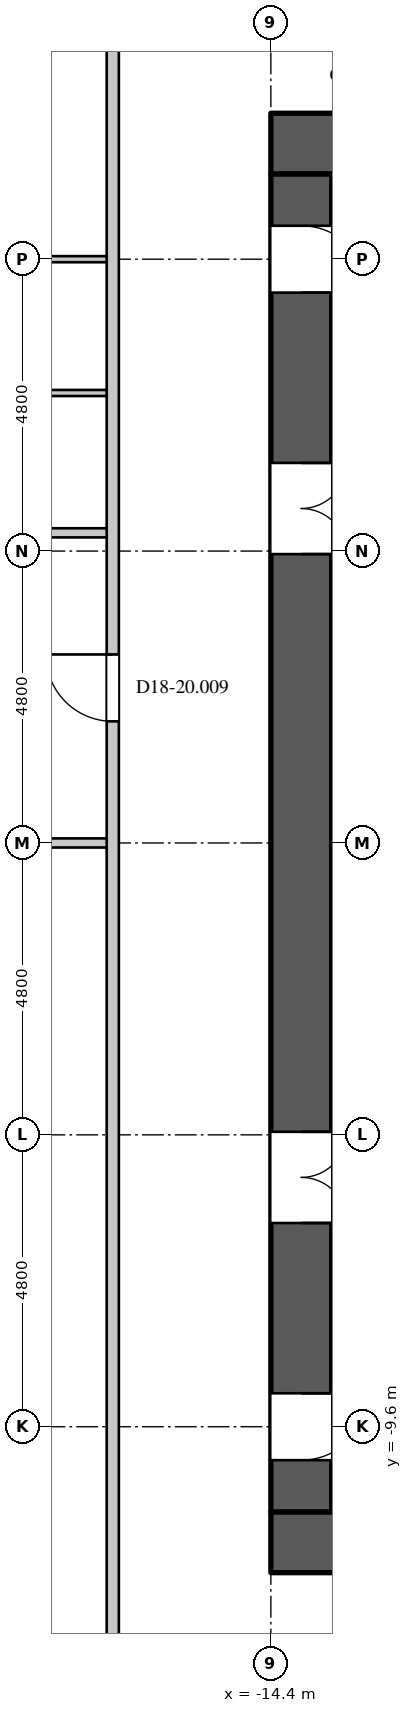
"""IFC4 building model, lengths in metres.
Left out: names, types, materials, properties, quantities, classifications, styles, units other than length and angle.
Written with IfcOpenShell. Run it as: python <this file> out.ifc"""

import sys

from ifc_helpers import new_model, si_unit, direction, frame, frame_2d, origin, place, context, subcontext, project, spatial, rectangle, extrude, element, fill, save


model = new_model("IFC4")
c1 = context("Model", 3, precision=1e-05, world=origin(), true_north=direction((0.0, 1.0)))
c2 = subcontext(c1, "Body", "Model", "MODEL_VIEW")
j1 = project(units=[si_unit("LENGTHUNIT", "METRE"), si_unit("PLANEANGLEUNIT", "RADIAN")], contexts=[c1])
p1 = place(None, origin())
s1 = spatial("IfcSite", under=j1, at=p1, CompositionType="ELEMENT")
p2 = place(p1, origin())
s2 = spatial("IfcBuilding", under=s1, at=p2, CompositionType="ELEMENT")
p3 = place(p2, frame((0.0, 0.0, 80.1)))
s3 = spatial("IfcBuildingStorey", under=s2, at=p3, CompositionType="ELEMENT", Elevation=80.1)
for number, where, z_axis, x_axis in (
    (1, (-14.4, 11.5, 0.0), (0.0, 0.0, 1.0), (1.0, 0.0, 0.0)),
    (2, (-14.4, -11.5, 0.0), (0.0, 0.0, 1.0), (1.0, 0.0, 0.0)),
):
    element("IfcWall", number, at=place(p3, frame(where, z_axis=z_axis, x_axis=x_axis)), inside=s3, PredefinedType="SHEAR", context=c2, shape_type="SweptSolid", body=[
        extrude(rectangle(XDim=28.8, YDim=1.0, at=frame_2d((14.4, 0.0))), origin(), (0.0, 0.0, 1.0), 4.2),
    ])
p4 = place(p3, frame((-13.9, -11.0, 0.0), z_axis=(0.0, 0.0, 1.0), x_axis=(0.0, 1.0, 0.0)))
e3 = element("IfcWall", 3, at=p4, inside=s3, PredefinedType="SHEAR", context=c2, shape_type="SweptSolid", body=[
    extrude(rectangle(XDim=22.0, YDim=1.0, at=frame_2d((11.0, 0.0))), origin(), (0.0, 0.0, 1.0), 4.2),
])
p5 = place(p4, frame((20.05, 0.0, 0.0)))
e4 = element("IfcOpeningElement", 4, at=p5, cuts=e3, PredefinedType="OPENING", context=c2, shape_type="SweptSolid", body=[
    extrude(rectangle(XDim=1.1, YDim=2.2, at=frame_2d((0.55, 1.1))), frame((0.0, 0.51, 0.0), z_axis=(0.0, -1.0, 0.0), x_axis=(1.0, 0.0, 0.0)), (0.0, 0.0, 1.0), 1.02),
])
p6 = place(p4, frame((0.85, 0.0, 0.0)))
e5 = element("IfcOpeningElement", 5, at=p6, cuts=e3, PredefinedType="OPENING", context=c2, shape_type="SweptSolid", body=[
    extrude(rectangle(XDim=1.1, YDim=2.2, at=frame_2d((0.55, 1.1))), frame((0.0, 0.51, 0.0), z_axis=(0.0, -1.0, 0.0), x_axis=(1.0, 0.0, 0.0)), (0.0, 0.0, 1.0), 1.02),
])
p7 = place(p4, frame((15.75, 0.0, 0.0)))
e6 = element("IfcOpeningElement", 6, at=p7, cuts=e3, PredefinedType="OPENING", context=c2, shape_type="SweptSolid", body=[
    extrude(rectangle(XDim=1.5, YDim=2.4, at=frame_2d((0.75, 1.2))), frame((0.0, 0.51, 0.0), z_axis=(0.0, -1.0, 0.0), x_axis=(1.0, 0.0, 0.0)), (0.0, 0.0, 1.0), 1.02),
])
p8 = place(p4, frame((4.75, 0.0, 0.0)))
e7 = element("IfcOpeningElement", 7, at=p8, cuts=e3, PredefinedType="OPENING", context=c2, shape_type="SweptSolid", body=[
    extrude(rectangle(XDim=1.5, YDim=2.4, at=frame_2d((0.75, 1.2))), frame((0.0, 0.51, 0.0), z_axis=(0.0, -1.0, 0.0), x_axis=(1.0, 0.0, 0.0)), (0.0, 0.0, 1.0), 1.02),
])
p9 = place(p3, frame((-17.0, -14.5, 0.0), z_axis=(0.0, 0.0, 1.0), x_axis=(0.0, 1.0, 0.0)))
e8 = element("IfcWall", 8, at=p9, inside=s3, PredefinedType="PARTITIONING", context=c2, shape_type="SweptSolid", body=[
    extrude(rectangle(XDim=29.0, YDim=0.2, at=frame_2d((14.5, 0.0))), origin(), (0.0, 0.0, 1.0), 3.95),
])
p10 = place(p9, frame((16.5, 0.0, 0.0)))
e9 = element("IfcOpeningElement", 9, at=p10, cuts=e8, PredefinedType="OPENING", context=c2, shape_type="SweptSolid", body=[
    extrude(rectangle(XDim=1.1, YDim=2.4, at=frame_2d((0.55, 1.2))), frame((0.0, 0.11, 0.0), z_axis=(0.0, -1.0, 0.0), x_axis=(1.0, 0.0, 0.0)), (0.0, 0.0, 1.0), 0.22),
])
p11 = place(p3, frame((-22.547, -11.885, 0.0), z_axis=(0.0, 0.0, 1.0), x_axis=(0.707106781187, -0.707106781187, 0.0)))
e10 = element("IfcWall", 10, at=p11, inside=s3, PredefinedType="PARTITIONING", context=c2, shape_type="SweptSolid", body=[
    extrude(rectangle(XDim=15.078, YDim=0.15, at=frame_2d((7.539, 0.0))), origin(), (0.0, 0.0, 1.0), 3.95),
])
p12 = place(p11, frame((3.95, 0.0, 0.0)))
e11 = element("IfcOpeningElement", 11, at=p12, cuts=e10, PredefinedType="OPENING", context=c2, shape_type="SweptSolid", body=[
    extrude(rectangle(XDim=0.95, YDim=2.2, at=frame_2d((0.475, 1.1))), frame((0.0, 0.085, 0.0), z_axis=(0.0, -1.0, 0.0), x_axis=(1.0, 0.0, 0.0)), (0.0, 0.0, 1.0), 0.17),
])
p13 = place(p11, frame((9.55, 0.0, 0.0)))
e12 = element("IfcOpeningElement", 12, at=p13, cuts=e10, PredefinedType="OPENING", context=c2, shape_type="SweptSolid", body=[
    extrude(rectangle(XDim=0.95, YDim=2.2, at=frame_2d((0.475, 1.1))), frame((0.0, 0.085, 0.0), z_axis=(0.0, -1.0, 0.0), x_axis=(1.0, 0.0, 0.0)), (0.0, 0.0, 1.0), 0.17),
])
p14 = place(p11, frame((13.95, 0.0, 0.0)))
e13 = element("IfcOpeningElement", 13, at=p14, cuts=e10, PredefinedType="OPENING", context=c2, shape_type="SweptSolid", body=[
    extrude(rectangle(XDim=0.95, YDim=2.2, at=frame_2d((0.475, 1.1))), frame((0.0, 0.085, 0.0), z_axis=(0.0, -1.0, 0.0), x_axis=(1.0, 0.0, 0.0)), (0.0, 0.0, 1.0), 0.17),
])
p15 = place(p3, frame((-22.547, 11.885, 0.0), z_axis=(0.0, 0.0, 1.0), x_axis=(0.707106781187, 0.707106781187, 0.0)))
e14 = element("IfcWall", 14, at=p15, inside=s3, PredefinedType="PARTITIONING", context=c2, shape_type="SweptSolid", body=[
    extrude(rectangle(XDim=9.85, YDim=0.15, at=frame_2d((4.925, 0.0))), origin(), (0.0, 0.0, 1.0), 3.95),
])
p16 = place(p15, frame((3.95, 0.0, 0.0)))
e15 = element("IfcOpeningElement", 15, at=p16, cuts=e14, PredefinedType="OPENING", context=c2, shape_type="SweptSolid", body=[
    extrude(rectangle(XDim=0.95, YDim=2.2, at=frame_2d((0.475, 1.1))), frame((0.0, 0.085, 0.0), z_axis=(0.0, -1.0, 0.0), x_axis=(1.0, 0.0, 0.0)), (0.0, 0.0, 1.0), 0.17),
])
p17 = place(p15, frame((8.25, 0.0, 0.0)))
e16 = element("IfcOpeningElement", 16, at=p17, cuts=e14, PredefinedType="OPENING", context=c2, shape_type="SweptSolid", body=[
    extrude(rectangle(XDim=0.95, YDim=2.2, at=frame_2d((0.475, 1.1))), frame((0.0, 0.085, 0.0), z_axis=(0.0, -1.0, 0.0), x_axis=(1.0, 0.0, 0.0)), (0.0, 0.0, 1.0), 0.17),
])
p18 = place(p3, frame((-21.725, 5.1, 0.0), z_axis=(0.0, 0.0, 1.0), x_axis=(1.0, 0.0, 0.0)))
e17 = element("IfcWall", 17, at=p18, inside=s3, PredefinedType="PARTITIONING", context=c2, shape_type="SweptSolid", body=[
    extrude(rectangle(XDim=4.625, YDim=0.15, at=frame_2d((2.312, 0.0))), origin(), (0.0, 0.0, 1.0), 3.95),
])
p19 = place(p18, frame((1.85, 0.0, 0.0)))
e18 = element("IfcOpeningElement", 18, at=p19, cuts=e17, PredefinedType="OPENING", context=c2, shape_type="SweptSolid", body=[
    extrude(rectangle(XDim=0.95, YDim=2.2, at=frame_2d((0.475, 1.1))), frame((0.0, 0.085, 0.0), z_axis=(0.0, -1.0, 0.0), x_axis=(1.0, 0.0, 0.0)), (0.0, 0.0, 1.0), 0.17),
])
p20 = place(p3, frame((-18.38, 0.0, 0.0), z_axis=(0.0, 0.0, 1.0), x_axis=(1.0, 0.0, 0.0)))
e19 = element("IfcWall", 19, at=p20, inside=s3, PredefinedType="PARTITIONING", context=c2, shape_type="SweptSolid", body=[
    extrude(rectangle(XDim=1.28, YDim=0.15, at=frame_2d((0.64, 0.0))), origin(), (0.0, 0.0, 1.0), 3.95),
])
p21 = place(p3, frame((-21.78, 9.6, 0.0), z_axis=(0.0, 0.0, 1.0), x_axis=(1.0, 0.0, 0.0)))
e20 = element("IfcWall", 20, at=p21, inside=s3, PredefinedType="PARTITIONING", context=c2, shape_type="SweptSolid", body=[
    extrude(rectangle(XDim=4.68, YDim=0.1, at=frame_2d((2.34, 0.0))), origin(), (0.0, 0.0, 1.0), 3.95),
])
p22 = place(p21, frame((1.85, 0.0, 0.0)))
e21 = element("IfcOpeningElement", 21, at=p22, cuts=e20, PredefinedType="OPENING", context=c2, shape_type="SweptSolid", body=[
    extrude(rectangle(XDim=0.9, YDim=2.2, at=frame_2d((0.45, 1.1))), frame((0.0, 0.06, 0.0), z_axis=(0.0, -1.0, 0.0), x_axis=(1.0, 0.0, 0.0)), (0.0, 0.0, 1.0), 0.12),
])
p23 = place(p3, frame((-21.725, 7.4, 0.0), z_axis=(0.0, 0.0, 1.0), x_axis=(1.0, 0.0, 0.0)))
e22 = element("IfcWall", 22, at=p23, inside=s3, PredefinedType="PARTITIONING", context=c2, shape_type="SweptSolid", body=[
    extrude(rectangle(XDim=4.625, YDim=0.1, at=frame_2d((2.312, 0.0))), origin(), (0.0, 0.0, 1.0), 3.95),
])
p24 = place(p5, origin())
e23 = element("IfcDoor", 23, at=p24, inside=s3, OperationType="SINGLE_SWING_RIGHT", PredefinedType="DOOR", context=c2, shape_type="SweptSolid", body=[
    extrude(rectangle(XDim=1.1, YDim=2.2, at=frame_2d((0.55, 1.1))), frame((0.0, -0.445, 0.0), z_axis=(0.0, -1.0, 0.0), x_axis=(1.0, 0.0, 0.0)), (0.0, 0.0, 1.0), 0.05),
])
fill(e4, e23)
p25 = place(p6, origin())
e24 = element("IfcDoor", 24, at=p25, inside=s3, OperationType="SINGLE_SWING_LEFT", PredefinedType="DOOR", context=c2, shape_type="SweptSolid", body=[
    extrude(rectangle(XDim=1.1, YDim=2.2, at=frame_2d((0.55, 1.1))), frame((0.0, -0.445, 0.0), z_axis=(0.0, -1.0, 0.0), x_axis=(1.0, 0.0, 0.0)), (0.0, 0.0, 1.0), 0.05),
])
fill(e5, e24)
p26 = place(p7, origin())
e25 = element("IfcDoor", 25, at=p26, inside=s3, OperationType="DOUBLE_DOOR_SINGLE_SWING", PredefinedType="DOOR", context=c2, shape_type="SweptSolid", body=[
    extrude(rectangle(XDim=1.5, YDim=2.4, at=frame_2d((0.75, 1.2))), frame((0.0, -0.445, 0.0), z_axis=(0.0, -1.0, 0.0), x_axis=(1.0, 0.0, 0.0)), (0.0, 0.0, 1.0), 0.05),
])
fill(e6, e25)
p27 = place(p8, origin())
e26 = element("IfcDoor", 26, at=p27, inside=s3, OperationType="DOUBLE_DOOR_SINGLE_SWING", PredefinedType="DOOR", context=c2, shape_type="SweptSolid", body=[
    extrude(rectangle(XDim=1.5, YDim=2.4, at=frame_2d((0.75, 1.2))), frame((0.0, -0.445, 0.0), z_axis=(0.0, -1.0, 0.0), x_axis=(1.0, 0.0, 0.0)), (0.0, 0.0, 1.0), 0.05),
])
fill(e7, e26)
p28 = place(p10, origin())
e27 = element("IfcDoor", 27, at=p28, inside=s3, OperationType="SINGLE_SWING_RIGHT", PredefinedType="DOOR", context=c2, shape_type="SweptSolid", body=[
    extrude(rectangle(XDim=1.1, YDim=2.4, at=frame_2d((0.55, 1.2))), frame((0.0, 0.025, 0.0), z_axis=(0.0, -1.0, 0.0), x_axis=(1.0, 0.0, 0.0)), (0.0, 0.0, 1.0), 0.05),
])
fill(e9, e27)
save(model, sys.argv[1])
